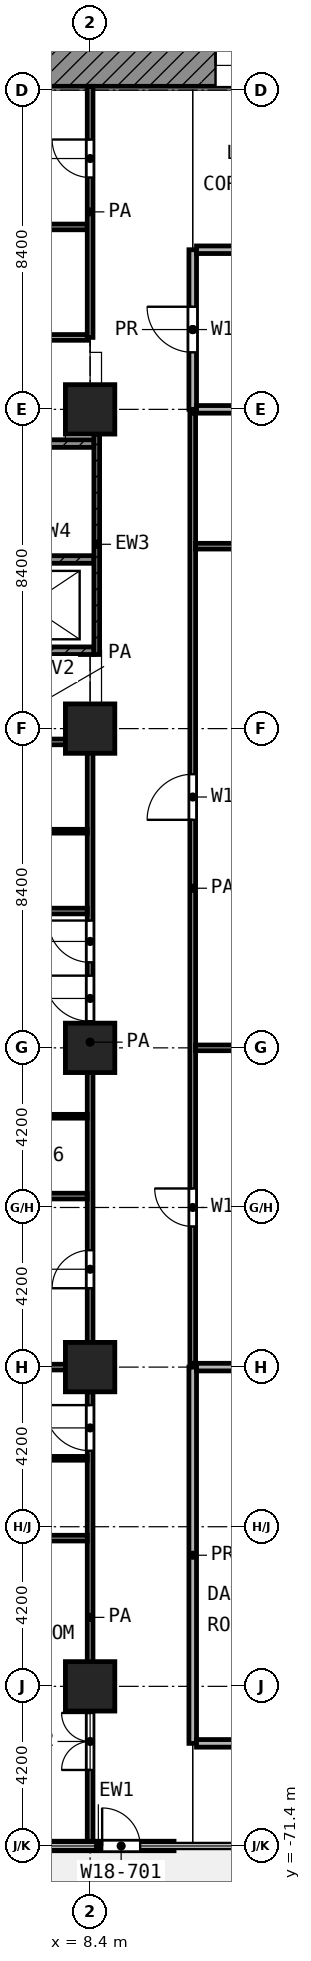
"""IFC4 building model, lengths in metres.
Left out: names, types, materials, properties, quantities, classifications, styles, units other than length and angle.
Written with IfcOpenShell. Run it as: python <this file> out.ifc"""

import sys

from ifc_helpers import new_model, si_unit, direction, frame, frame_2d, origin, origin_2d, place, context, subcontext, project, spatial, rectangle, extrude, element, fill, save


model = new_model("IFC4")
c1 = context("Model", 3, precision=1e-05, world=origin(), true_north=direction((0.0, 1.0)))
c2 = subcontext(c1, "Body", "Model", "MODEL_VIEW")
j1 = project(units=[si_unit("LENGTHUNIT", "METRE"), si_unit("PLANEANGLEUNIT", "RADIAN")], contexts=[c1])
p1 = place(None, origin())
s1 = spatial("IfcSite", under=j1, at=p1, CompositionType="ELEMENT")
p2 = place(p1, origin())
s2 = spatial("IfcBuilding", under=s1, at=p2, CompositionType="ELEMENT")
p3 = place(p2, frame((0.0, 0.0, 81.2)))
s3 = spatial("IfcBuildingStorey", under=s2, at=p3, CompositionType="ELEMENT", Elevation=81.2)
for number, where, z_axis, x_axis in (
    (1, (8.4, -33.6, 0.0), (0.0, 0.0, 1.0), (1.0, 0.0, 0.0)),
    (2, (8.4, -42.0, 0.0), (0.0, 0.0, 1.0), (1.0, 0.0, 0.0)),
    (3, (8.4, -50.4, 0.0), (0.0, 0.0, 1.0), (1.0, 0.0, 0.0)),
    (4, (8.4, -58.8, 0.0), (0.0, 0.0, 1.0), (1.0, 0.0, 0.0)),
    (5, (8.4, -67.2, 0.0), (0.0, 0.0, 1.0), (1.0, 0.0, 0.0)),
):
    element("IfcColumn", number, at=place(p3, frame(where, z_axis=z_axis, x_axis=x_axis)), inside=s3, PredefinedType="COLUMN", context=c2, shape_type="SweptSolid", body=[
        extrude(rectangle(XDim=1.3, YDim=1.3, at=origin_2d()), origin(), (0.0, 0.0, 1.0), 4.2),
    ])
p4 = place(p3, frame((6.625, -71.4, 0.0), z_axis=(0.0, 0.0, 1.0), x_axis=(1.0, 0.0, 0.0)))
e6 = element("IfcWall", 6, at=p4, inside=s3, PredefinedType="SOLIDWALL", context=c2, shape_type="SweptSolid", body=[
    extrude(rectangle(XDim=3.983, YDim=0.25, at=frame_2d((1.992, 0.0))), origin(), (0.0, 0.0, 1.0), 3.78),
])
p5 = place(p4, frame((2.092, 0.0, 0.0)))
e7 = element("IfcOpeningElement", 7, at=p5, cuts=e6, PredefinedType="OPENING", context=c2, shape_type="SweptSolid", body=[
    extrude(rectangle(XDim=1.0, YDim=2.1, at=frame_2d((0.5, 1.05))), frame((0.0, 0.135, 0.0), z_axis=(0.0, -1.0, 0.0), x_axis=(1.0, 0.0, 0.0)), (0.0, 0.0, 1.0), 0.27),
])
p6 = place(p3, frame((5.4, -24.55, 0.0), z_axis=(0.0, 0.0, 1.0), x_axis=(1.0, 0.0, 0.0)))
e8 = element("IfcWall", 8, at=p6, inside=s3, PredefinedType="SHEAR", context=c2, shape_type="SweptSolid", body=[
    extrude(rectangle(XDim=18.6, YDim=1.1, at=frame_2d((9.3, 0.0))), origin(), (0.0, 0.0, 1.0), 3.9),
])
p7 = place(p6, frame((6.3, 0.0, 0.0)))
e9 = element("IfcOpeningElement", 9, at=p7, cuts=e8, PredefinedType="OPENING", context=c2, shape_type="SweptSolid", body=[
    extrude(rectangle(XDim=1.8, YDim=2.1, at=frame_2d((0.9, 1.05))), frame((0.0, 0.56, 0.0), z_axis=(0.0, -1.0, 0.0), x_axis=(1.0, 0.0, 0.0)), (0.0, 0.0, 1.0), 1.12),
])
p8 = place(p3, frame((8.575, -40.05, 0.0), z_axis=(0.0, 0.0, 1.0), x_axis=(0.0, 1.0, 0.0)))
e10 = element("IfcWall", 10, at=p8, inside=s3, PredefinedType="SHEAR", context=c2, shape_type="SweptSolid", body=[
    extrude(rectangle(XDim=5.8, YDim=0.15, at=frame_2d((2.9, 0.0))), origin(), (0.0, 0.0, 1.0), 3.9),
])
p9 = place(p3, frame((0.45, -34.5, 0.0), z_axis=(0.0, 0.0, 1.0), x_axis=(1.0, 0.0, 0.0)))
e11 = element("IfcWall", 11, at=p9, inside=s3, PredefinedType="SHEAR", context=c2, shape_type="SweptSolid", body=[
    extrude(rectangle(XDim=8.05, YDim=0.2, at=frame_2d((4.025, 0.0))), origin(), (0.0, 0.0, 1.0), 3.9),
])
p10 = place(p9, frame((0.75, 0.0, 0.0)))
e12 = element("IfcOpeningElement", 12, at=p10, cuts=e11, PredefinedType="OPENING", context=c2, shape_type="SweptSolid", body=[
    extrude(rectangle(XDim=1.1, YDim=2.1, at=frame_2d((0.55, 1.05))), frame((0.0, 0.11, 0.0), z_axis=(0.0, -1.0, 0.0), x_axis=(1.0, 0.0, 0.0)), (0.0, 0.0, 1.0), 0.22),
])
p11 = place(p3, frame((0.45, -37.55, 0.0), z_axis=(0.0, 0.0, 1.0), x_axis=(1.0, 0.0, 0.0)))
e13 = element("IfcWall", 13, at=p11, inside=s3, PredefinedType="SHEAR", context=c2, shape_type="SweptSolid", body=[
    extrude(rectangle(XDim=8.05, YDim=0.2, at=frame_2d((4.025, 0.0))), origin(), (0.0, 0.0, 1.0), 3.9),
])
p12 = place(p11, frame((0.1, 0.0, 0.0)))
e14 = element("IfcOpeningElement", 14, at=p12, cuts=e13, PredefinedType="OPENING", context=c2, shape_type="SweptSolid", body=[
    extrude(rectangle(XDim=1.1, YDim=2.1, at=frame_2d((0.55, 1.05))), frame((0.0, 0.11, 0.0), z_axis=(0.0, -1.0, 0.0), x_axis=(1.0, 0.0, 0.0)), (0.0, 0.0, 1.0), 0.22),
])
p13 = place(p3, frame((0.45, -39.95, 0.0), z_axis=(0.0, 0.0, 1.0), x_axis=(1.0, 0.0, 0.0)))
e15 = element("IfcWall", 15, at=p13, inside=s3, PredefinedType="SHEAR", context=c2, shape_type="SweptSolid", body=[
    extrude(rectangle(XDim=8.05, YDim=0.2, at=frame_2d((4.025, 0.0))), origin(), (0.0, 0.0, 1.0), 3.9),
])
p14 = place(p13, frame((2.0, 0.0, 0.0)))
e16 = element("IfcOpeningElement", 16, at=p14, cuts=e15, PredefinedType="OPENING", context=c2, shape_type="SweptSolid", body=[
    extrude(rectangle(XDim=1.1, YDim=2.1, at=frame_2d((0.55, 1.05))), frame((0.0, 0.11, 0.0), z_axis=(0.0, -1.0, 0.0), x_axis=(1.0, 0.0, 0.0)), (0.0, 0.0, 1.0), 0.22),
])
p15 = place(p3, frame((5.75, -61.2, 0.0), z_axis=(0.0, 0.0, 1.0), x_axis=(1.0, 0.0, 0.0)))
e17 = element("IfcWall", 17, at=p15, inside=s3, PredefinedType="PARTITIONING", context=c2, shape_type="SweptSolid", body=[
    extrude(rectangle(XDim=2.575, YDim=0.1, at=frame_2d((1.288, 0.0))), origin(), (0.0, 0.0, 1.0), 3.9),
])
p16 = place(p3, frame((5.151, -52.2, 0.0), z_axis=(0.0, 0.0, 1.0), x_axis=(1.0, 0.0, 0.0)))
e18 = element("IfcWall", 18, at=p16, inside=s3, PredefinedType="PARTITIONING", context=c2, shape_type="SweptSolid", body=[
    extrude(rectangle(XDim=3.174, YDim=0.1, at=frame_2d((1.587, 0.0))), origin(), (0.0, 0.0, 1.0), 3.9),
])
p17 = place(p3, frame((5.75, -44.7, 0.0), z_axis=(0.0, 0.0, 1.0), x_axis=(1.0, 0.0, 0.0)))
e19 = element("IfcWall", 19, at=p17, inside=s3, PredefinedType="PARTITIONING", context=c2, shape_type="SweptSolid", body=[
    extrude(rectangle(XDim=2.575, YDim=0.1, at=frame_2d((1.288, 0.0))), origin(), (0.0, 0.0, 1.0), 3.9),
])
p18 = place(p3, frame((0.08, -63.3, 0.0), z_axis=(0.0, 0.0, 1.0), x_axis=(1.0, 0.0, 0.0)))
e20 = element("IfcWall", 20, at=p18, inside=s3, PredefinedType="PARTITIONING", context=c2, shape_type="SweptSolid", body=[
    extrude(rectangle(XDim=8.245, YDim=0.15, at=frame_2d((4.123, 0.0))), origin(), (0.0, 0.0, 1.0), 3.9),
])
p19 = place(p3, frame((0.6, -58.8, 0.0), z_axis=(0.0, 0.0, 1.0), x_axis=(1.0, 0.0, 0.0)))
e21 = element("IfcWall", 21, at=p19, inside=s3, PredefinedType="PARTITIONING", context=c2, shape_type="SweptSolid", body=[
    extrude(rectangle(XDim=7.15, YDim=0.15, at=frame_2d((3.575, 0.0))), origin(), (0.0, 0.0, 1.0), 3.9),
])
p20 = place(p3, frame((0.08, -54.3, 0.0), z_axis=(0.0, 0.0, 1.0), x_axis=(1.0, 0.0, 0.0)))
e22 = element("IfcWall", 22, at=p20, inside=s3, PredefinedType="PARTITIONING", context=c2, shape_type="SweptSolid", body=[
    extrude(rectangle(XDim=8.245, YDim=0.15, at=frame_2d((4.123, 0.0))), origin(), (0.0, 0.0, 1.0), 3.9),
])
p21 = place(p3, frame((11.175, -50.4, 0.0), z_axis=(0.0, 0.0, 1.0), x_axis=(1.0, 0.0, 0.0)))
e23 = element("IfcWall", 23, at=p21, inside=s3, PredefinedType="PARTITIONING", context=c2, shape_type="SweptSolid", body=[
    extrude(rectangle(XDim=2.85, YDim=0.15, at=frame_2d((1.425, 0.0))), origin(), (0.0, 0.0, 1.0), 3.9),
])
p22 = place(p3, frame((0.08, -46.8, 0.0), z_axis=(0.0, 0.0, 1.0), x_axis=(1.0, 0.0, 0.0)))
e24 = element("IfcWall", 24, at=p22, inside=s3, PredefinedType="PARTITIONING", context=c2, shape_type="SweptSolid", body=[
    extrude(rectangle(XDim=8.245, YDim=0.15, at=frame_2d((4.123, 0.0))), origin(), (0.0, 0.0, 1.0), 3.9),
])
p23 = place(p3, frame((2.325, -42.35, 0.0), z_axis=(0.0, 0.0, 1.0), x_axis=(1.0, 0.0, 0.0)))
e25 = element("IfcWall", 25, at=p23, inside=s3, PredefinedType="PARTITIONING", context=c2, shape_type="SweptSolid", body=[
    extrude(rectangle(XDim=6.0, YDim=0.15, at=frame_2d((3.0, 0.0))), origin(), (0.0, 0.0, 1.0), 3.9),
])
p24 = place(p23, frame((3.425, 0.0, 0.0)))
e26 = element("IfcOpeningElement", 26, at=p24, cuts=e25, PredefinedType="OPENING", context=c2, shape_type="SweptSolid", body=[
    extrude(rectangle(XDim=1.2, YDim=2.1, at=frame_2d((0.6, 1.05))), frame((0.0, 0.085, 0.0), z_axis=(0.0, -1.0, 0.0), x_axis=(1.0, 0.0, 0.0)), (0.0, 0.0, 1.0), 0.17),
])
p25 = place(p23, frame((1.375, 0.0, 0.0)))
e27 = element("IfcOpeningElement", 27, at=p25, cuts=e25, PredefinedType="OPENING", context=c2, shape_type="SweptSolid", body=[
    extrude(rectangle(XDim=1.2, YDim=2.1, at=frame_2d((0.6, 1.05))), frame((0.0, 0.085, 0.0), z_axis=(0.0, -1.0, 0.0), x_axis=(1.0, 0.0, 0.0)), (0.0, 0.0, 1.0), 0.17),
])
p26 = place(p3, frame((11.175, -37.2, 0.0), z_axis=(0.0, 0.0, 1.0), x_axis=(1.0, 0.0, 0.0)))
e28 = element("IfcWall", 28, at=p26, inside=s3, PredefinedType="PARTITIONING", context=c2, shape_type="SweptSolid", body=[
    extrude(rectangle(XDim=2.85, YDim=0.15, at=frame_2d((1.425, 0.0))), origin(), (0.0, 0.0, 1.0), 3.9),
])
p27 = place(p3, frame((1.077, -31.707, 0.0), z_axis=(0.0, 0.0, 1.0), x_axis=(1.0, 0.0, 0.0)))
e29 = element("IfcWall", 29, at=p27, inside=s3, PredefinedType="PARTITIONING", context=c2, shape_type="SweptSolid", body=[
    extrude(rectangle(XDim=7.248, YDim=0.15, at=frame_2d((3.624, 0.0))), origin(), (0.0, 0.0, 1.0), 3.9),
])
p28 = place(p27, frame((3.024, 0.0, 0.0)))
e30 = element("IfcOpeningElement", 30, at=p28, cuts=e29, PredefinedType="OPENING", context=c2, shape_type="SweptSolid", body=[
    extrude(rectangle(XDim=1.2, YDim=2.1, at=frame_2d((0.6, 1.05))), frame((0.0, 0.085, 0.0), z_axis=(0.0, -1.0, 0.0), x_axis=(1.0, 0.0, 0.0)), (0.0, 0.0, 1.0), 0.17),
])
p29 = place(p3, frame((0.08, -28.8, 0.0), z_axis=(0.0, 0.0, 1.0), x_axis=(1.0, 0.0, 0.0)))
e31 = element("IfcWall", 31, at=p29, inside=s3, PredefinedType="PARTITIONING", context=c2, shape_type="SweptSolid", body=[
    extrude(rectangle(XDim=8.245, YDim=0.15, at=frame_2d((4.123, 0.0))), origin(), (0.0, 0.0, 1.0), 3.9),
])
p30 = place(p3, frame((8.4, -71.32, 0.0), z_axis=(0.0, 0.0, 1.0), x_axis=(0.0, 1.0, 0.0)))
e32 = element("IfcWall", 32, at=p30, inside=s3, PredefinedType="PARTITIONING", context=c2, shape_type="SweptSolid", body=[
    extrude(rectangle(XDim=11.87, YDim=0.15, at=frame_2d((5.935, 0.0))), origin(), (0.0, 0.0, 1.0), 3.9),
])
p31 = place(p30, frame((10.32, 0.0, 0.0)))
e33 = element("IfcOpeningElement", 33, at=p31, cuts=e32, PredefinedType="OPENING", context=c2, shape_type="SweptSolid", body=[
    extrude(rectangle(XDim=1.2, YDim=2.1, at=frame_2d((0.6, 1.05))), frame((0.0, 0.085, 0.0), z_axis=(0.0, -1.0, 0.0), x_axis=(1.0, 0.0, 0.0)), (0.0, 0.0, 1.0), 0.17),
])
p32 = place(p30, frame((1.92, 0.0, 0.0)))
e34 = element("IfcOpeningElement", 34, at=p32, cuts=e32, PredefinedType="OPENING", context=c2, shape_type="SweptSolid", body=[
    extrude(rectangle(XDim=1.5, YDim=2.1, at=frame_2d((0.75, 1.05))), frame((0.0, 0.085, 0.0), z_axis=(0.0, -1.0, 0.0), x_axis=(1.0, 0.0, 0.0)), (0.0, 0.0, 1.0), 0.17),
])
p33 = place(p3, frame((8.4, -58.15, 0.0), z_axis=(0.0, 0.0, 1.0), x_axis=(0.0, 1.0, 0.0)))
e35 = element("IfcWall", 35, at=p33, inside=s3, PredefinedType="PARTITIONING", context=c2, shape_type="SweptSolid", body=[
    extrude(rectangle(XDim=15.8, YDim=0.15, at=frame_2d((7.9, 0.0))), origin(), (0.0, 0.0, 1.0), 3.9),
])
p34 = place(p33, frame((8.45, 0.0, 0.0)))
e36 = element("IfcOpeningElement", 36, at=p34, cuts=e35, PredefinedType="OPENING", context=c2, shape_type="SweptSolid", body=[
    extrude(rectangle(XDim=1.2, YDim=2.1, at=frame_2d((0.6, 1.05))), frame((0.0, 0.085, 0.0), z_axis=(0.0, -1.0, 0.0), x_axis=(1.0, 0.0, 0.0)), (0.0, 0.0, 1.0), 0.17),
])
p35 = place(p33, frame((10.0, 0.0, 0.0)))
e37 = element("IfcOpeningElement", 37, at=p35, cuts=e35, PredefinedType="OPENING", context=c2, shape_type="SweptSolid", body=[
    extrude(rectangle(XDim=1.1, YDim=2.1, at=frame_2d((0.55, 1.05))), frame((0.0, 0.085, 0.0), z_axis=(0.0, -1.0, 0.0), x_axis=(1.0, 0.0, 0.0)), (0.0, 0.0, 1.0), 0.17),
])
p36 = place(p33, frame((1.425, 0.0, 0.0)))
e38 = element("IfcOpeningElement", 38, at=p36, cuts=e35, PredefinedType="OPENING", context=c2, shape_type="SweptSolid", body=[
    extrude(rectangle(XDim=1.0, YDim=2.1, at=frame_2d((0.5, 1.05))), frame((0.0, 0.085, 0.0), z_axis=(0.0, -1.0, 0.0), x_axis=(1.0, 0.0, 0.0)), (0.0, 0.0, 1.0), 0.17),
])
p37 = place(p3, frame((8.4, -31.707, 0.0), z_axis=(0.0, 0.0, 1.0), x_axis=(0.0, 1.0, 0.0)))
e39 = element("IfcWall", 39, at=p37, inside=s3, PredefinedType="PARTITIONING", context=c2, shape_type="SweptSolid", body=[
    extrude(rectangle(XDim=6.607, YDim=0.15, at=frame_2d((3.303, 0.0))), origin(), (0.0, 0.0, 1.0), 3.9),
])
p38 = place(p37, frame((4.207, 0.0, 0.0)))
e40 = element("IfcOpeningElement", 40, at=p38, cuts=e39, PredefinedType="OPENING", context=c2, shape_type="SweptSolid", body=[
    extrude(rectangle(XDim=1.0, YDim=2.1, at=frame_2d((0.5, 1.05))), frame((0.0, 0.085, 0.0), z_axis=(0.0, -1.0, 0.0), x_axis=(1.0, 0.0, 0.0)), (0.0, 0.0, 1.0), 0.17),
])
p39 = place(p3, frame((11.1, -58.7, 0.0), z_axis=(0.0, 0.0, 1.0), x_axis=(0.0, 1.0, 0.0)))
e41 = element("IfcWall", 41, at=p39, inside=s3, PredefinedType="PARTITIONING", context=c2, shape_type="SweptSolid", body=[
    extrude(rectangle(XDim=25.0, YDim=0.15, at=frame_2d((12.5, 0.0))), origin(), (0.0, 0.0, 1.0), 3.9),
])
p40 = place(p39, frame((14.3, 0.0, 0.0)))
e42 = element("IfcOpeningElement", 42, at=p40, cuts=e41, PredefinedType="OPENING", context=c2, shape_type="SweptSolid", body=[
    extrude(rectangle(XDim=1.2, YDim=2.1, at=frame_2d((0.6, 1.05))), frame((0.0, 0.085, 0.0), z_axis=(0.0, -1.0, 0.0), x_axis=(1.0, 0.0, 0.0)), (0.0, 0.0, 1.0), 0.17),
])
p41 = place(p39, frame((3.6, 0.0, 0.0)))
e43 = element("IfcOpeningElement", 43, at=p41, cuts=e41, PredefinedType="OPENING", context=c2, shape_type="SweptSolid", body=[
    extrude(rectangle(XDim=1.0, YDim=2.1, at=frame_2d((0.5, 1.05))), frame((0.0, 0.085, 0.0), z_axis=(0.0, -1.0, 0.0), x_axis=(1.0, 0.0, 0.0)), (0.0, 0.0, 1.0), 0.17),
])
for number, where, z_axis, x_axis in (
    (44, (11.2, -68.7, 0.0), (0.0, 0.0, 1.0), (1.0, 0.0, 0.0)),
    (45, (11.2, -58.8, 0.0), (0.0, 0.0, 1.0), (1.0, 0.0, 0.0)),
    (46, (11.2, -33.6, 0.0), (0.0, 0.0, 1.0), (1.0, 0.0, 0.0)),
    (47, (11.2, -29.4, 0.0), (0.0, 0.0, 1.0), (1.0, 0.0, 0.0)),
):
    element("IfcWall", number, at=place(p3, frame(where, z_axis=z_axis, x_axis=x_axis)), inside=s3, PredefinedType="PARTITIONING", context=c2, shape_type="SweptSolid", body=[
        extrude(rectangle(XDim=2.8, YDim=0.2, at=frame_2d((1.4, 0.0))), origin(), (0.0, 0.0, 1.0), 3.9),
    ])
p42 = place(p3, frame((11.1, -68.7, 0.0), z_axis=(0.0, 0.0, 1.0), x_axis=(0.0, 1.0, 0.0)))
e48 = element("IfcWall", 48, at=p42, inside=s3, PredefinedType="PARTITIONING", context=c2, shape_type="SweptSolid", body=[
    extrude(rectangle(XDim=9.9, YDim=0.2, at=frame_2d((4.95, 0.0))), origin(), (0.0, 0.0, 1.0), 3.9),
])
p43 = place(p3, frame((11.1, -33.6, 0.0), z_axis=(0.0, 0.0, 1.0), x_axis=(0.0, 1.0, 0.0)))
e49 = element("IfcWall", 49, at=p43, inside=s3, PredefinedType="PARTITIONING", context=c2, shape_type="SweptSolid", body=[
    extrude(rectangle(XDim=4.2, YDim=0.2, at=frame_2d((2.1, 0.0))), origin(), (0.0, 0.0, 1.0), 3.9),
])
p44 = place(p43, frame((1.5, 0.0, 0.0)))
e50 = element("IfcOpeningElement", 50, at=p44, cuts=e49, PredefinedType="OPENING", context=c2, shape_type="SweptSolid", body=[
    extrude(rectangle(XDim=1.2, YDim=2.1, at=frame_2d((0.6, 1.05))), frame((0.0, 0.11, 0.0), z_axis=(0.0, -1.0, 0.0), x_axis=(1.0, 0.0, 0.0)), (0.0, 0.0, 1.0), 0.22),
])
p45 = place(p5, origin())
e51 = element("IfcDoor", 51, at=p45, inside=s3, OperationType="SINGLE_SWING_LEFT", PredefinedType="DOOR", context=c2, shape_type="SweptSolid", body=[
    extrude(rectangle(XDim=1.0, YDim=2.1, at=frame_2d((0.5, 1.05))), frame((0.0, 0.025, 0.0), z_axis=(0.0, -1.0, 0.0), x_axis=(1.0, 0.0, 0.0)), (0.0, 0.0, 1.0), 0.05),
])
fill(e7, e51)
p46 = place(p7, origin())
e52 = element("IfcDoor", 52, at=p46, inside=s3, OperationType="DOUBLE_DOOR_SINGLE_SWING", PredefinedType="DOOR", context=c2, shape_type="SweptSolid", body=[
    extrude(rectangle(XDim=1.8, YDim=2.1, at=frame_2d((0.9, 1.05))), frame((0.0, 0.025, 0.0), z_axis=(0.0, -1.0, 0.0), x_axis=(1.0, 0.0, 0.0)), (0.0, 0.0, 1.0), 0.05),
])
fill(e9, e52)
p47 = place(p38, origin())
e53 = element("IfcDoor", 53, at=p47, inside=s3, OperationType="SINGLE_SWING_RIGHT", PredefinedType="DOOR", context=c2, shape_type="SweptSolid", body=[
    extrude(rectangle(XDim=1.0, YDim=2.1, at=frame_2d((0.5, 1.05))), frame((0.0, 0.025, 0.0), z_axis=(0.0, -1.0, 0.0), x_axis=(1.0, 0.0, 0.0)), (0.0, 0.0, 1.0), 0.05),
])
fill(e40, e53)
p48 = place(p34, origin())
e54 = element("IfcDoor", 54, at=p48, inside=s3, OperationType="SINGLE_SWING_RIGHT", PredefinedType="DOOR", context=c2, shape_type="SweptSolid", body=[
    extrude(rectangle(XDim=1.2, YDim=2.1, at=frame_2d((0.6, 1.05))), frame((0.0, 0.025, 0.0), z_axis=(0.0, -1.0, 0.0), x_axis=(1.0, 0.0, 0.0)), (0.0, 0.0, 1.0), 0.05),
])
fill(e36, e54)
p49 = place(p35, origin())
e55 = element("IfcDoor", 55, at=p49, inside=s3, OperationType="SINGLE_SWING_RIGHT", PredefinedType="DOOR", context=c2, shape_type="SweptSolid", body=[
    extrude(rectangle(XDim=1.1, YDim=2.1, at=frame_2d((0.55, 1.05))), frame((0.0, 0.025, 0.0), z_axis=(0.0, -1.0, 0.0), x_axis=(1.0, 0.0, 0.0)), (0.0, 0.0, 1.0), 0.05),
])
fill(e37, e55)
p50 = place(p36, origin())
e56 = element("IfcDoor", 56, at=p50, inside=s3, OperationType="SINGLE_SWING_LEFT", PredefinedType="DOOR", context=c2, shape_type="SweptSolid", body=[
    extrude(rectangle(XDim=1.0, YDim=2.1, at=frame_2d((0.5, 1.05))), frame((0.0, 0.025, 0.0), z_axis=(0.0, -1.0, 0.0), x_axis=(1.0, 0.0, 0.0)), (0.0, 0.0, 1.0), 0.05),
])
fill(e38, e56)
p51 = place(p31, origin())
e57 = element("IfcDoor", 57, at=p51, inside=s3, OperationType="SINGLE_SWING_RIGHT", PredefinedType="DOOR", context=c2, shape_type="SweptSolid", body=[
    extrude(rectangle(XDim=1.2, YDim=2.1, at=frame_2d((0.6, 1.05))), frame((0.0, 0.025, 0.0), z_axis=(0.0, -1.0, 0.0), x_axis=(1.0, 0.0, 0.0)), (0.0, 0.0, 1.0), 0.05),
])
fill(e33, e57)
p52 = place(p32, origin())
e58 = element("IfcDoor", 58, at=p52, inside=s3, OperationType="DOUBLE_DOOR_SINGLE_SWING", PredefinedType="DOOR", context=c2, shape_type="SweptSolid", body=[
    extrude(rectangle(XDim=1.5, YDim=2.1, at=frame_2d((0.75, 1.05))), frame((0.0, 0.025, 0.0), z_axis=(0.0, -1.0, 0.0), x_axis=(1.0, 0.0, 0.0)), (0.0, 0.0, 1.0), 0.05),
])
fill(e34, e58)
p53 = place(p44, origin())
e59 = element("IfcDoor", 59, at=p53, inside=s3, OperationType="SINGLE_SWING_RIGHT", PredefinedType="DOOR", context=c2, shape_type="SweptSolid", body=[
    extrude(rectangle(XDim=1.2, YDim=2.1, at=frame_2d((0.6, 1.05))), frame((0.0, 0.025, 0.0), z_axis=(0.0, -1.0, 0.0), x_axis=(1.0, 0.0, 0.0)), (0.0, 0.0, 1.0), 0.05),
])
fill(e50, e59)
p54 = place(p40, origin())
e60 = element("IfcDoor", 60, at=p54, inside=s3, OperationType="SINGLE_SWING_LEFT", PredefinedType="DOOR", context=c2, shape_type="SweptSolid", body=[
    extrude(rectangle(XDim=1.2, YDim=2.1, at=frame_2d((0.6, 1.05))), frame((0.0, 0.025, 0.0), z_axis=(0.0, -1.0, 0.0), x_axis=(1.0, 0.0, 0.0)), (0.0, 0.0, 1.0), 0.05),
])
fill(e42, e60)
p55 = place(p41, origin())
e61 = element("IfcDoor", 61, at=p55, inside=s3, OperationType="SINGLE_SWING_RIGHT", PredefinedType="DOOR", context=c2, shape_type="SweptSolid", body=[
    extrude(rectangle(XDim=1.0, YDim=2.1, at=frame_2d((0.5, 1.05))), frame((0.0, 0.025, 0.0), z_axis=(0.0, -1.0, 0.0), x_axis=(1.0, 0.0, 0.0)), (0.0, 0.0, 1.0), 0.05),
])
fill(e43, e61)
save(model, sys.argv[1])
